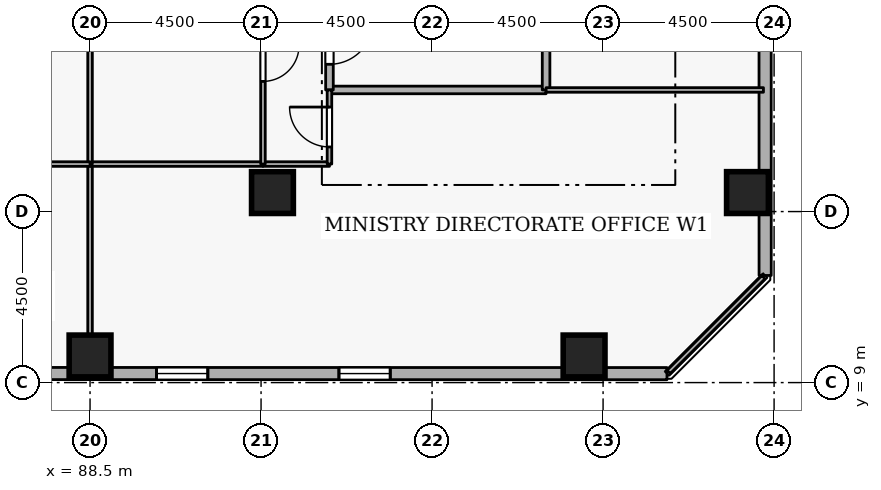
"""IFC4 building model, lengths in metres.
Left out: names, types, materials, properties, quantities, classifications, styles, units other than length and angle.
Written with IfcOpenShell. Run it as: python <this file> out.ifc"""

import sys

from ifc_helpers import new_model, si_unit, direction, frame, frame_2d, origin, origin_2d, place, context, subcontext, project, spatial, rectangle, extrude, element, fill, save


model = new_model("IFC4")
c1 = context("Model", 3, precision=1e-05, world=origin(), true_north=direction((0.0, 1.0)))
c2 = subcontext(c1, "Body", "Model", "MODEL_VIEW")
j1 = project(units=[si_unit("LENGTHUNIT", "METRE"), si_unit("PLANEANGLEUNIT", "RADIAN")], contexts=[c1])
p1 = place(None, origin())
s1 = spatial("IfcSite", under=j1, at=p1, CompositionType="ELEMENT")
p2 = place(p1, origin())
s2 = spatial("IfcBuilding", under=s1, at=p2, CompositionType="ELEMENT")
p3 = place(p2, frame((0.0, 0.0, 196.5)))
s3 = spatial("IfcBuildingStorey", under=s2, at=p3, CompositionType="ELEMENT", Elevation=196.5)
for number, where, z_axis, x_axis in (
    (1, (105.8, 14.0, 0.0), (0.0, 0.0, 1.0), (1.0, 0.0, 0.0)),
    (2, (101.5, 9.7, 0.0), (0.0, 0.0, 1.0), (1.0, 0.0, 0.0)),
    (3, (88.5, 9.7, 0.0), (0.0, 0.0, 1.0), (1.0, 0.0, 0.0)),
    (4, (93.3, 14.0, 0.0), (0.0, 0.0, 1.0), (1.0, 0.0, 0.0)),
):
    element("IfcColumn", number, at=place(p3, frame(where, z_axis=z_axis, x_axis=x_axis)), inside=s3, PredefinedType="COLUMN", context=c2, shape_type="SweptSolid", body=[
        extrude(rectangle(XDim=1.1, YDim=1.1, at=origin_2d()), origin(), (0.0, 0.0, 1.0), 3.6),
    ])
p4 = place(p3, frame((69.249, 9.242, 0.0), z_axis=(0.0, 0.0, 1.0), x_axis=(0.999999983007, -0.000184351399, 0.0)))
e5 = element("IfcWall", 5, at=p4, inside=s3, PredefinedType="STANDARD", context=c2, shape_type="SweptSolid", body=[
    extrude(rectangle(XDim=34.432, YDim=0.32, at=frame_2d((17.216, 0.0))), origin(), (0.0, 0.0, 1.0), 2.22),
])
p5 = place(p4, frame((1.8, 0.0, 0.72)))
e6 = element("IfcOpeningElement", 6, at=p5, cuts=e5, PredefinedType="OPENING", context=c2, shape_type="SweptSolid", body=[
    extrude(rectangle(XDim=1.35, YDim=1.05, at=frame_2d((0.675, 0.525))), frame((0.0, 0.17, 0.0), z_axis=(0.0, -1.0, 0.0), x_axis=(1.0, 0.0, 0.0)), (0.0, 0.0, 1.0), 0.34),
])
p6 = place(p4, frame((11.4, 0.0, 0.72)))
e7 = element("IfcOpeningElement", 7, at=p6, cuts=e5, PredefinedType="OPENING", context=c2, shape_type="SweptSolid", body=[
    extrude(rectangle(XDim=1.35, YDim=1.05, at=frame_2d((0.675, 0.525))), frame((0.0, 0.17, 0.0), z_axis=(0.0, -1.0, 0.0), x_axis=(1.0, 0.0, 0.0)), (0.0, 0.0, 1.0), 0.34),
])
p7 = place(p4, frame((16.2, 0.0, 0.72)))
e8 = element("IfcOpeningElement", 8, at=p7, cuts=e5, PredefinedType="OPENING", context=c2, shape_type="SweptSolid", body=[
    extrude(rectangle(XDim=1.35, YDim=1.05, at=frame_2d((0.675, 0.525))), frame((0.0, 0.17, 0.0), z_axis=(0.0, -1.0, 0.0), x_axis=(1.0, 0.0, 0.0)), (0.0, 0.0, 1.0), 0.34),
])
p8 = place(p4, frame((21.0, 0.0, 0.72)))
e9 = element("IfcOpeningElement", 9, at=p8, cuts=e5, PredefinedType="OPENING", context=c2, shape_type="SweptSolid", body=[
    extrude(rectangle(XDim=1.35, YDim=1.05, at=frame_2d((0.675, 0.525))), frame((0.0, 0.17, 0.0), z_axis=(0.0, -1.0, 0.0), x_axis=(1.0, 0.0, 0.0)), (0.0, 0.0, 1.0), 0.34),
])
p9 = place(p4, frame((25.8, 0.0, 0.72)))
e10 = element("IfcOpeningElement", 10, at=p9, cuts=e5, PredefinedType="OPENING", context=c2, shape_type="SweptSolid", body=[
    extrude(rectangle(XDim=1.35, YDim=1.05, at=frame_2d((0.675, 0.525))), frame((0.0, 0.17, 0.0), z_axis=(0.0, -1.0, 0.0), x_axis=(1.0, 0.0, 0.0)), (0.0, 0.0, 1.0), 0.34),
])
p10 = place(p3, frame((106.265, 11.819, 0.0), z_axis=(0.0, 0.0, 1.0), x_axis=(-0.000184351399, 0.999999983007, 0.0)))
e11 = element("IfcWall", 11, at=p10, inside=s3, PredefinedType="STANDARD", context=c2, shape_type="SweptSolid", body=[
    extrude(rectangle(XDim=34.432, YDim=0.32, at=frame_2d((17.216, 0.0))), origin(), (0.0, 0.0, 1.0), 2.22),
])
p11 = place(p10, frame((6.6, 0.0, 0.72)))
e12 = element("IfcOpeningElement", 12, at=p11, cuts=e11, PredefinedType="OPENING", context=c2, shape_type="SweptSolid", body=[
    extrude(rectangle(XDim=1.35, YDim=1.05, at=frame_2d((0.675, 0.525))), frame((0.0, 0.17, 0.0), z_axis=(0.0, -1.0, 0.0), x_axis=(1.0, 0.0, 0.0)), (0.0, 0.0, 1.0), 0.34),
])
p12 = place(p10, frame((11.4, 0.0, 0.72)))
e13 = element("IfcOpeningElement", 13, at=p12, cuts=e11, PredefinedType="OPENING", context=c2, shape_type="SweptSolid", body=[
    extrude(rectangle(XDim=1.35, YDim=1.05, at=frame_2d((0.675, 0.525))), frame((0.0, 0.17, 0.0), z_axis=(0.0, -1.0, 0.0), x_axis=(1.0, 0.0, 0.0)), (0.0, 0.0, 1.0), 0.34),
])
p13 = place(p10, frame((21.0, 0.0, 0.72)))
e14 = element("IfcOpeningElement", 14, at=p13, cuts=e11, PredefinedType="OPENING", context=c2, shape_type="SweptSolid", body=[
    extrude(rectangle(XDim=1.35, YDim=1.05, at=frame_2d((0.675, 0.525))), frame((0.0, 0.17, 0.0), z_axis=(0.0, -1.0, 0.0), x_axis=(1.0, 0.0, 0.0)), (0.0, 0.0, 1.0), 0.34),
])
p14 = place(p10, frame((30.6, 0.0, 0.72)))
e15 = element("IfcOpeningElement", 15, at=p14, cuts=e11, PredefinedType="OPENING", context=c2, shape_type="SweptSolid", body=[
    extrude(rectangle(XDim=1.35, YDim=1.05, at=frame_2d((0.675, 0.525))), frame((0.0, 0.17, 0.0), z_axis=(0.0, -1.0, 0.0), x_axis=(1.0, 0.0, 0.0)), (0.0, 0.0, 1.0), 0.34),
])
p15 = place(p3, frame((94.8, 16.7, 0.0), z_axis=(0.0, 0.0, 1.0), x_axis=(1.0, 0.0, 0.0)))
e16 = element("IfcWall", 16, at=p15, inside=s3, PredefinedType="STANDARD", context=c2, shape_type="SweptSolid", body=[
    extrude(rectangle(XDim=5.7, YDim=0.2, at=frame_2d((2.85, 0.0))), origin(), (0.0, 0.0, 1.0), 3.32),
])
p16 = place(p3, frame((100.5, 16.7, 0.0), z_axis=(0.0, 0.0, 1.0), x_axis=(0.0, 1.0, 0.0)))
e17 = element("IfcWall", 17, at=p16, inside=s3, PredefinedType="STANDARD", context=c2, shape_type="SweptSolid", body=[
    extrude(rectangle(XDim=2.5, YDim=0.2, at=frame_2d((1.25, 0.0))), origin(), (0.0, 0.0, 1.0), 3.32),
])
p17 = place(p3, frame((94.8, 19.2, 0.0), z_axis=(0.0, 0.0, 1.0), x_axis=(0.0, -1.0, 0.0)))
e18 = element("IfcWall", 18, at=p17, inside=s3, PredefinedType="STANDARD", context=c2, shape_type="SweptSolid", body=[
    extrude(rectangle(XDim=2.5, YDim=0.2, at=frame_2d((1.25, 0.0))), origin(), (0.0, 0.0, 1.0), 3.32),
])
p18 = place(p17, frame((0.675, 0.0, 0.0)))
e19 = element("IfcOpeningElement", 19, at=p18, cuts=e18, PredefinedType="OPENING", context=c2, shape_type="SweptSolid", body=[
    extrude(rectangle(XDim=1.15, YDim=2.1, at=frame_2d((0.575, 1.05))), frame((0.0, 0.11, 0.0), z_axis=(0.0, -1.0, 0.0), x_axis=(1.0, 0.0, 0.0)), (0.0, 0.0, 1.0), 0.22),
])
p19 = place(p3, frame((88.5, 9.28, 0.0), z_axis=(0.0, 0.0, 1.0), x_axis=(0.0, 1.0, 0.0)))
e20 = element("IfcWall", 20, at=p19, inside=s3, PredefinedType="PARTITIONING", context=c2, shape_type="SweptSolid", body=[
    extrude(rectangle(XDim=5.47, YDim=0.12, at=frame_2d((2.735, 0.0))), origin(), (0.0, 0.0, 1.0), 1.785),
])
p20 = place(p3, frame((88.5, 14.75, 0.0), z_axis=(0.0, 0.0, 1.0), x_axis=(1.0, 0.0, 0.0)))
e21 = element("IfcWall", 21, at=p20, inside=s3, PredefinedType="PARTITIONING", context=c2, shape_type="SweptSolid", body=[
    extrude(rectangle(XDim=4.55, YDim=0.12, at=frame_2d((2.275, 0.0))), origin(), (0.0, 0.0, 1.0), 3.32),
])
p21 = place(p3, frame((93.05, 14.75, 0.0), z_axis=(0.0, 0.0, 1.0), x_axis=(1.0, 0.0, 0.0)))
e22 = element("IfcWall", 22, at=p21, inside=s3, PredefinedType="PARTITIONING", context=c2, shape_type="SweptSolid", body=[
    extrude(rectangle(XDim=1.75, YDim=0.12, at=frame_2d((0.875, 0.0))), origin(), (0.0, 0.0, 1.0), 3.32),
])
p22 = place(p3, frame((94.8, 14.75, 0.0), z_axis=(0.0, 0.0, 1.0), x_axis=(0.0, 1.0, 0.0)))
e23 = element("IfcWall", 23, at=p22, inside=s3, PredefinedType="PARTITIONING", context=c2, shape_type="SweptSolid", body=[
    extrude(rectangle(XDim=1.95, YDim=0.12, at=frame_2d((0.975, 0.0))), origin(), (0.0, 0.0, 1.0), 3.32),
])
p23 = place(p22, frame((0.45, 0.0, 0.0)))
e24 = element("IfcOpeningElement", 24, at=p23, cuts=e23, PredefinedType="OPENING", context=c2, shape_type="SweptSolid", body=[
    extrude(rectangle(XDim=1.05, YDim=2.1, at=frame_2d((0.525, 1.05))), frame((0.0, 0.07, 0.0), z_axis=(0.0, -1.0, 0.0), x_axis=(1.0, 0.0, 0.0)), (0.0, 0.0, 1.0), 0.14),
])
p24 = place(p3, frame((100.5, 16.7, 0.0), z_axis=(0.0, 0.0, 1.0), x_axis=(1.0, 0.0, 0.0)))
e25 = element("IfcWall", 25, at=p24, inside=s3, PredefinedType="PARTITIONING", context=c2, shape_type="SweptSolid", body=[
    extrude(rectangle(XDim=5.72, YDim=0.12, at=frame_2d((2.86, 0.0))), origin(), (0.0, 0.0, 1.0), 3.32),
])
p25 = place(p3, frame((106.22, 11.775, 0.0), z_axis=(0.0, 0.0, 1.0), x_axis=(-0.707106781187, -0.707106781187, 0.0)))
e26 = element("IfcWall", 26, at=p25, inside=s3, PredefinedType="PARTITIONING", context=c2, shape_type="SweptSolid", body=[
    extrude(rectangle(XDim=3.528, YDim=0.12, at=frame_2d((1.764, 0.0))), origin(), (0.0, 0.0, 1.0), 3.32),
])
p26 = place(p3, frame((88.5, 14.75, 0.0), z_axis=(0.0, 0.0, 1.0), x_axis=(0.0, 1.0, 0.0)))
e27 = element("IfcWall", 27, at=p26, inside=s3, PredefinedType="PARTITIONING", context=c2, shape_type="SweptSolid", body=[
    extrude(rectangle(XDim=5.3, YDim=0.12, at=frame_2d((2.65, 0.0))), origin(), (0.0, 0.0, 1.0), 1.785),
])
p27 = place(p3, frame((93.05, 20.05, 0.0), z_axis=(0.0, 0.0, 1.0), x_axis=(0.0, -1.0, 0.0)))
e28 = element("IfcWall", 28, at=p27, inside=s3, PredefinedType="PARTITIONING", context=c2, shape_type="SweptSolid", body=[
    extrude(rectangle(XDim=5.3, YDim=0.12, at=frame_2d((2.65, 0.0))), origin(), (0.0, 0.0, 1.0), 3.32),
])
p28 = place(p27, frame((2.175, 0.0, 0.0)))
e29 = element("IfcOpeningElement", 29, at=p28, cuts=e28, PredefinedType="OPENING", context=c2, shape_type="SweptSolid", body=[
    extrude(rectangle(XDim=0.95, YDim=2.1, at=frame_2d((0.475, 1.05))), frame((0.0, 0.07, 0.0), z_axis=(0.0, -1.0, 0.0), x_axis=(1.0, 0.0, 0.0)), (0.0, 0.0, 1.0), 0.14),
])
p29 = place(p3, frame((88.5, 14.75, 0.0), z_axis=(0.0, 0.0, 1.0), x_axis=(-1.0, 0.0, 0.0)))
e30 = element("IfcWall", 30, at=p29, inside=s3, PredefinedType="PARTITIONING", context=c2, shape_type="SweptSolid", body=[
    extrude(rectangle(XDim=2.3, YDim=0.12, at=frame_2d((1.15, 0.0))), origin(), (0.0, 0.0, 1.0), 3.32),
])
p30 = place(p8, origin())
e31 = element("IfcWindow", 31, at=p30, inside=s3, PartitioningType="SINGLE_PANEL", PredefinedType="WINDOW", context=c2, shape_type="SweptSolid", body=[
    extrude(rectangle(XDim=1.35, YDim=1.05, at=frame_2d((0.675, 0.525))), frame((0.0, 0.03, 0.0), z_axis=(0.0, -1.0, 0.0), x_axis=(1.0, 0.0, 0.0)), (0.0, 0.0, 1.0), 0.06),
])
fill(e9, e31)
p31 = place(p9, origin())
e32 = element("IfcWindow", 32, at=p31, inside=s3, PartitioningType="SINGLE_PANEL", PredefinedType="WINDOW", context=c2, shape_type="SweptSolid", body=[
    extrude(rectangle(XDim=1.35, YDim=1.05, at=frame_2d((0.675, 0.525))), frame((0.0, 0.03, 0.0), z_axis=(0.0, -1.0, 0.0), x_axis=(1.0, 0.0, 0.0)), (0.0, 0.0, 1.0), 0.06),
])
fill(e10, e32)
p32 = place(p18, origin())
e33 = element("IfcDoor", 33, at=p32, inside=s3, OperationType="SINGLE_SWING_LEFT", PredefinedType="DOOR", context=c2, shape_type="SweptSolid", body=[
    extrude(rectangle(XDim=1.15, YDim=2.1, at=frame_2d((0.575, 1.05))), frame((0.0, 0.025, 0.0), z_axis=(0.0, -1.0, 0.0), x_axis=(1.0, 0.0, 0.0)), (0.0, 0.0, 1.0), 0.05),
])
fill(e19, e33)
p33 = place(p23, origin())
e34 = element("IfcDoor", 34, at=p33, inside=s3, OperationType="SINGLE_SWING_RIGHT", PredefinedType="DOOR", context=c2, shape_type="SweptSolid", body=[
    extrude(rectangle(XDim=1.05, YDim=2.1, at=frame_2d((0.525, 1.05))), frame((0.0, 0.025, 0.0), z_axis=(0.0, -1.0, 0.0), x_axis=(1.0, 0.0, 0.0)), (0.0, 0.0, 1.0), 0.05),
])
fill(e24, e34)
p34 = place(p28, origin())
e35 = element("IfcDoor", 35, at=p34, inside=s3, OperationType="SINGLE_SWING_LEFT", PredefinedType="DOOR", context=c2, shape_type="SweptSolid", body=[
    extrude(rectangle(XDim=0.95, YDim=2.1, at=frame_2d((0.475, 1.05))), frame((0.0, 0.025, 0.0), z_axis=(0.0, -1.0, 0.0), x_axis=(1.0, 0.0, 0.0)), (0.0, 0.0, 1.0), 0.05),
])
fill(e29, e35)
save(model, sys.argv[1])
